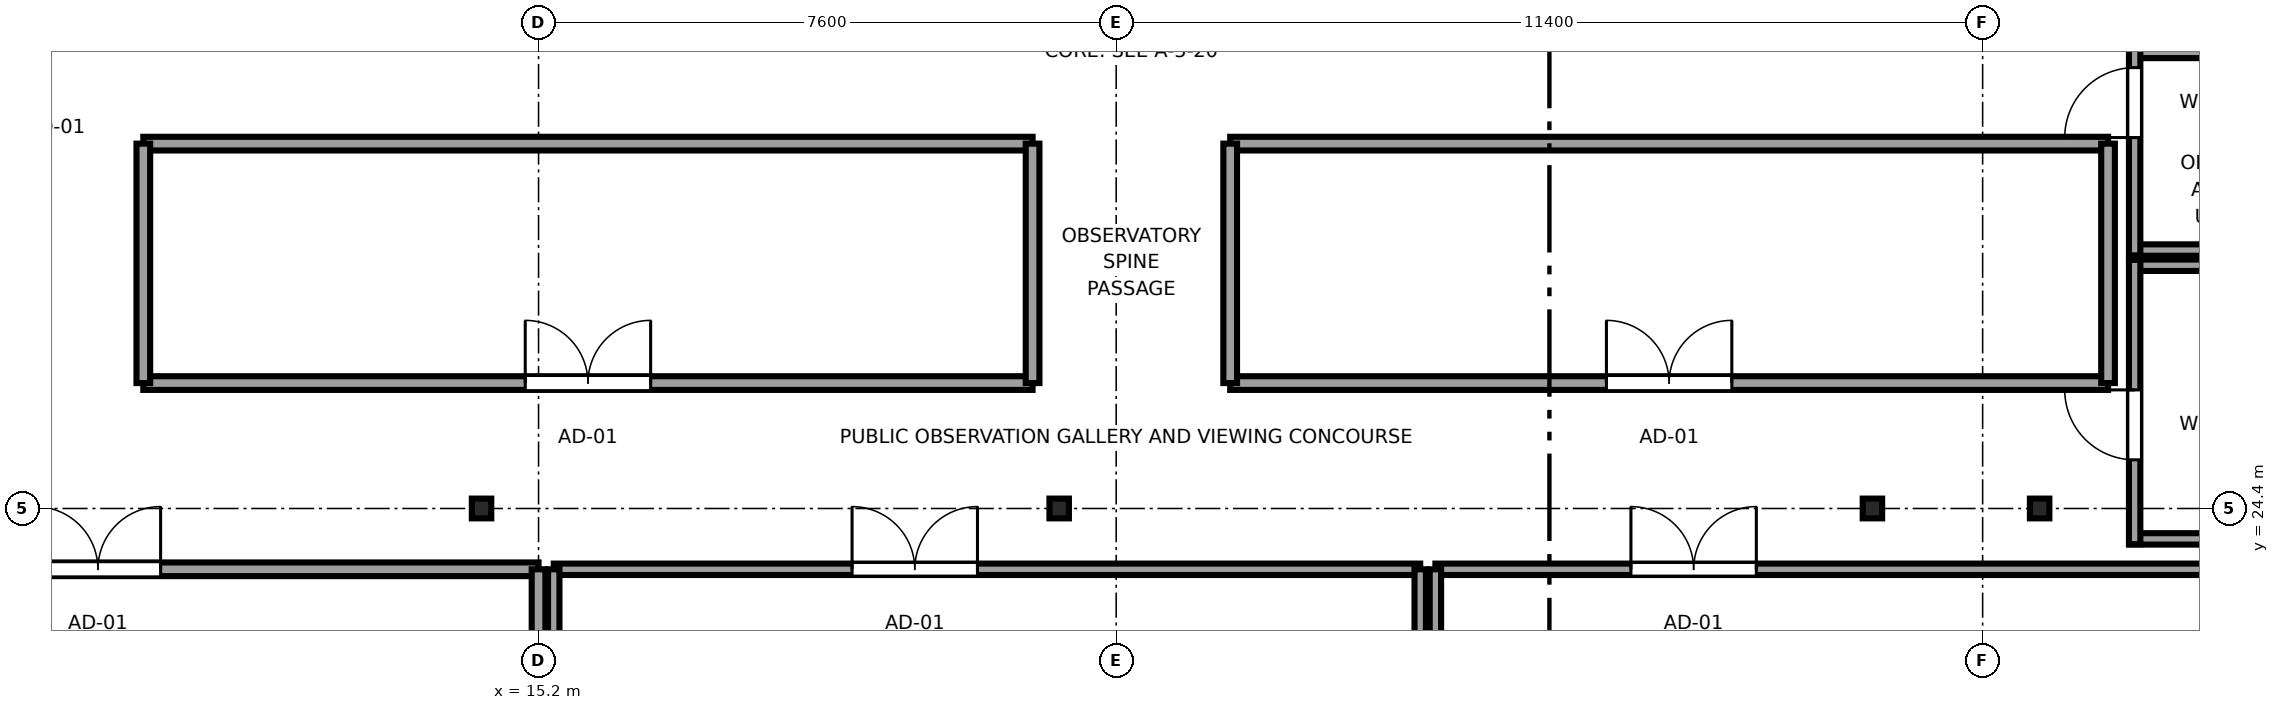
"""IFC4 building model, lengths in metres.
Left out: names, types, materials, properties, quantities, classifications, styles, units other than length and angle.
Written with IfcOpenShell. Run it as: python <this file> out.ifc"""

import sys

from ifc_helpers import new_model, si_unit, direction, frame, frame_2d, origin, origin_2d, place, context, subcontext, project, spatial, rectangle, i_section, extrude, source, transform, mapped, element, fill, save


model = new_model("IFC4")
c1 = context("Model", 3, precision=1e-05, world=origin(), true_north=direction((0.0, 1.0)))
c2 = subcontext(c1, "Body", "Model", "MODEL_VIEW")
j1 = project(units=[si_unit("LENGTHUNIT", "METRE"), si_unit("PLANEANGLEUNIT", "RADIAN")], contexts=[c1])
p1 = place(None, origin())
s1 = spatial("IfcSite", under=j1, at=p1, CompositionType="ELEMENT")
p2 = place(p1, origin())
s2 = spatial("IfcBuilding", under=s1, at=p2, CompositionType="ELEMENT")
p3 = place(p2, frame((0.0, 0.0, 282.15)))
s3 = spatial("IfcBuildingStorey", under=s2, at=p3, CompositionType="ELEMENT", Elevation=282.15)
m1 = source(origin(), c2, "Body", "SweptSolid", [
    extrude(i_section(OverallWidth=0.256, OverallDepth=0.26, WebThickness=0.01, FlangeThickness=0.017, FilletRadius=0.014, at=origin_2d()), origin(), (0.0, 0.0, 1.0), 4.4),
])
for number, where, z_axis, x_axis in (
    (1, (14.45, 24.4, 0.0), (0.0, 0.0, 1.0), (1.0, 0.0, 0.0)),
    (2, (22.05, 24.4, 0.0), (0.0, 0.0, 1.0), (1.0, 0.0, 0.0)),
    (3, (32.75, 24.4, 0.0), (0.0, 0.0, 1.0), (1.0, 0.0, 0.0)),
    (4, (34.95, 24.4, 0.0), (0.0, 0.0, 1.0), (1.0, 0.0, 0.0)),
):
    element("IfcColumn", number, at=place(p3, frame(where, z_axis=z_axis, x_axis=x_axis)), inside=s3, PredefinedType="COLUMN", context=c2, shape_type="MappedRepresentation", body=[
        mapped(m1, transform((0.0, 0.0, 0.0), x_axis=(1.0, 0.0, 0.0), y_axis=(0.0, 1.0, 0.0), z_axis=(0.0, 0.0, 1.0), scale=1.0)),
    ])
p4 = place(p3, frame((3.005, 23.6, 0.0), z_axis=(0.0, 0.0, 1.0), x_axis=(1.0, 0.0, 0.0)))
e5 = element("IfcWall", 5, at=p4, inside=s3, PredefinedType="PARTITIONING", context=c2, shape_type="SweptSolid", body=[
    extrude(rectangle(XDim=12.195, YDim=0.18, at=frame_2d((6.098, 0.0))), origin(), (0.0, 0.0, 1.0), 4.18),
])
p5 = place(p4, frame((5.573, 0.0, 0.0)))
e6 = element("IfcOpeningElement", 6, at=p5, cuts=e5, PredefinedType="OPENING", context=c2, shape_type="SweptSolid", body=[
    extrude(rectangle(XDim=1.65, YDim=2.15, at=frame_2d((0.825, 1.075))), frame((0.0, 0.1, 0.0), z_axis=(0.0, -1.0, 0.0), x_axis=(1.0, 0.0, 0.0)), (0.0, 0.0, 1.0), 0.2),
])
p6 = place(p3, frame((15.2, 5.605, 0.0), z_axis=(0.0, 0.0, 1.0), x_axis=(0.0, 1.0, 0.0)))
e7 = element("IfcWall", 7, at=p6, inside=s3, PredefinedType="PARTITIONING", context=c2, shape_type="SweptSolid", body=[
    extrude(rectangle(XDim=17.995, YDim=0.18, at=frame_2d((8.998, 0.0))), origin(), (0.0, 0.0, 1.0), 4.18),
])
p7 = place(p3, frame((15.4, 23.6, 0.0), z_axis=(0.0, 0.0, 1.0), x_axis=(1.0, 0.0, 0.0)))
e8 = element("IfcWall", 8, at=p7, inside=s3, PredefinedType="PARTITIONING", context=c2, shape_type="SweptSolid", body=[
    extrude(rectangle(XDim=11.4, YDim=0.15, at=frame_2d((5.7, 0.0))), origin(), (0.0, 0.0, 1.0), 4.18),
])
p8 = place(p7, frame((3.925, 0.0, 0.0)))
e9 = element("IfcOpeningElement", 9, at=p8, cuts=e8, PredefinedType="OPENING", context=c2, shape_type="SweptSolid", body=[
    extrude(rectangle(XDim=1.65, YDim=2.15, at=frame_2d((0.825, 1.075))), frame((0.0, 0.085, 0.0), z_axis=(0.0, -1.0, 0.0), x_axis=(1.0, 0.0, 0.0)), (0.0, 0.0, 1.0), 0.17),
])
for number, where, z_axis, x_axis in (
    (10, (15.4, 5.605, 0.0), (0.0, 0.0, 1.0), (0.0, 1.0, 0.0)),
    (11, (26.8, 5.605, 0.0), (0.0, 0.0, 1.0), (0.0, 1.0, 0.0)),
):
    element("IfcWall", number, at=place(p3, frame(where, z_axis=z_axis, x_axis=x_axis)), inside=s3, PredefinedType="PARTITIONING", context=c2, shape_type="SweptSolid", body=[
        extrude(rectangle(XDim=17.995, YDim=0.15, at=frame_2d((8.998, 0.0))), origin(), (0.0, 0.0, 1.0), 4.18),
    ])
p9 = place(p3, frame((27.0, 23.6, 0.0), z_axis=(0.0, 0.0, 1.0), x_axis=(1.0, 0.0, 0.0)))
e12 = element("IfcWall", 12, at=p9, inside=s3, PredefinedType="PARTITIONING", context=c2, shape_type="SweptSolid", body=[
    extrude(rectangle(XDim=11.595, YDim=0.15, at=frame_2d((5.797, 0.0))), origin(), (0.0, 0.0, 1.0), 4.18),
])
p10 = place(p9, frame((2.573, 0.0, 0.0)))
e13 = element("IfcOpeningElement", 13, at=p10, cuts=e12, PredefinedType="OPENING", context=c2, shape_type="SweptSolid", body=[
    extrude(rectangle(XDim=1.65, YDim=2.15, at=frame_2d((0.825, 1.075))), frame((0.0, 0.085, 0.0), z_axis=(0.0, -1.0, 0.0), x_axis=(1.0, 0.0, 0.0)), (0.0, 0.0, 1.0), 0.17),
])
p11 = place(p3, frame((27.0, 5.605, 0.0), z_axis=(0.0, 0.0, 1.0), x_axis=(0.0, 1.0, 0.0)))
e14 = element("IfcWall", 14, at=p11, inside=s3, PredefinedType="PARTITIONING", context=c2, shape_type="SweptSolid", body=[
    extrude(rectangle(XDim=17.995, YDim=0.15, at=frame_2d((8.998, 0.0))), origin(), (0.0, 0.0, 1.0), 4.18),
])
p12 = place(p3, frame((10.0, 26.05, 0.0), z_axis=(0.0, 0.0, 1.0), x_axis=(1.0, 0.0, 0.0)))
e15 = element("IfcWall", 15, at=p12, inside=s3, PredefinedType="PARTITIONING", context=c2, shape_type="SweptSolid", body=[
    extrude(rectangle(XDim=11.7, YDim=0.18, at=frame_2d((5.85, 0.0))), origin(), (0.0, 0.0, 1.0), 4.18),
])
p13 = place(p12, frame((5.025, 0.0, 0.0)))
e16 = element("IfcOpeningElement", 16, at=p13, cuts=e15, PredefinedType="OPENING", context=c2, shape_type="SweptSolid", body=[
    extrude(rectangle(XDim=1.65, YDim=2.15, at=frame_2d((0.825, 1.075))), frame((0.0, 0.1, 0.0), z_axis=(0.0, -1.0, 0.0), x_axis=(1.0, 0.0, 0.0)), (0.0, 0.0, 1.0), 0.2),
])
p14 = place(p3, frame((10.0, 29.2, 0.0), z_axis=(0.0, 0.0, 1.0), x_axis=(1.0, 0.0, 0.0)))
e17 = element("IfcWall", 17, at=p14, inside=s3, PredefinedType="PARTITIONING", context=c2, shape_type="SweptSolid", body=[
    extrude(rectangle(XDim=11.7, YDim=0.18, at=frame_2d((5.85, 0.0))), origin(), (0.0, 0.0, 1.0), 4.18),
])
for number, where, z_axis, x_axis in (
    (18, (10.0, 26.05, 0.0), (0.0, 0.0, 1.0), (0.0, 1.0, 0.0)),
    (19, (21.7, 26.05, 0.0), (0.0, 0.0, 1.0), (0.0, 1.0, 0.0)),
):
    element("IfcWall", number, at=place(p3, frame(where, z_axis=z_axis, x_axis=x_axis)), inside=s3, PredefinedType="PARTITIONING", context=c2, shape_type="SweptSolid", body=[
        extrude(rectangle(XDim=3.15, YDim=0.18, at=frame_2d((1.575, 0.0))), origin(), (0.0, 0.0, 1.0), 4.18),
    ])
p15 = place(p3, frame((24.3, 26.05, 0.0), z_axis=(0.0, 0.0, 1.0), x_axis=(1.0, 0.0, 0.0)))
e20 = element("IfcWall", 20, at=p15, inside=s3, PredefinedType="PARTITIONING", context=c2, shape_type="SweptSolid", body=[
    extrude(rectangle(XDim=11.55, YDim=0.18, at=frame_2d((5.775, 0.0))), origin(), (0.0, 0.0, 1.0), 4.18),
])
p16 = place(p15, frame((4.95, 0.0, 0.0)))
e21 = element("IfcOpeningElement", 21, at=p16, cuts=e20, PredefinedType="OPENING", context=c2, shape_type="SweptSolid", body=[
    extrude(rectangle(XDim=1.65, YDim=2.15, at=frame_2d((0.825, 1.075))), frame((0.0, 0.1, 0.0), z_axis=(0.0, -1.0, 0.0), x_axis=(1.0, 0.0, 0.0)), (0.0, 0.0, 1.0), 0.2),
])
p17 = place(p3, frame((24.3, 29.2, 0.0), z_axis=(0.0, 0.0, 1.0), x_axis=(1.0, 0.0, 0.0)))
e22 = element("IfcWall", 22, at=p17, inside=s3, PredefinedType="PARTITIONING", context=c2, shape_type="SweptSolid", body=[
    extrude(rectangle(XDim=11.55, YDim=0.18, at=frame_2d((5.775, 0.0))), origin(), (0.0, 0.0, 1.0), 4.18),
])
for number, where, z_axis, x_axis in (
    (23, (24.3, 26.05, 0.0), (0.0, 0.0, 1.0), (0.0, 1.0, 0.0)),
    (24, (35.85, 26.05, 0.0), (0.0, 0.0, 1.0), (0.0, 1.0, 0.0)),
):
    element("IfcWall", number, at=place(p3, frame(where, z_axis=z_axis, x_axis=x_axis)), inside=s3, PredefinedType="PARTITIONING", context=c2, shape_type="SweptSolid", body=[
        extrude(rectangle(XDim=3.15, YDim=0.18, at=frame_2d((1.575, 0.0))), origin(), (0.0, 0.0, 1.0), 4.18),
    ])
for number, where, z_axis, x_axis in (
    (25, (36.13, 24.0, 0.0), (0.0, 0.0, 1.0), (1.0, 0.0, 0.0)),
    (26, (36.13, 27.6, 0.0), (0.0, 0.0, 1.0), (1.0, 0.0, 0.0)),
):
    element("IfcWall", number, at=place(p3, frame(where, z_axis=z_axis, x_axis=x_axis)), inside=s3, PredefinedType="PARTITIONING", context=c2, shape_type="SweptSolid", body=[
        extrude(rectangle(XDim=2.465, YDim=0.15, at=frame_2d((1.232, 0.0))), origin(), (0.0, 0.0, 1.0), 4.18),
    ])
p18 = place(p3, frame((36.2, 23.93, 0.0), z_axis=(0.0, 0.0, 1.0), x_axis=(0.0, 1.0, 0.0)))
e27 = element("IfcWall", 27, at=p18, inside=s3, PredefinedType="PARTITIONING", context=c2, shape_type="SweptSolid", body=[
    extrude(rectangle(XDim=3.74, YDim=0.15, at=frame_2d((1.87, 0.0))), origin(), (0.0, 0.0, 1.0), 4.18),
])
p19 = place(p18, frame((1.11, 0.0, 0.0)))
e28 = element("IfcOpeningElement", 28, at=p19, cuts=e27, PredefinedType="OPENING", context=c2, shape_type="SweptSolid", body=[
    extrude(rectangle(XDim=0.92, YDim=2.01, at=frame_2d((0.46, 1.005))), frame((0.0, 0.085, 0.0), z_axis=(0.0, -1.0, 0.0), x_axis=(1.0, 0.0, 0.0)), (0.0, 0.0, 1.0), 0.17),
])
for number, where, z_axis, x_axis in (
    (29, (36.13, 27.8, 0.0), (0.0, 0.0, 1.0), (1.0, 0.0, 0.0)),
    (30, (36.13, 30.4, 0.0), (0.0, 0.0, 1.0), (1.0, 0.0, 0.0)),
):
    element("IfcWall", number, at=place(p3, frame(where, z_axis=z_axis, x_axis=x_axis)), inside=s3, PredefinedType="PARTITIONING", context=c2, shape_type="SweptSolid", body=[
        extrude(rectangle(XDim=2.465, YDim=0.15, at=frame_2d((1.232, 0.0))), origin(), (0.0, 0.0, 1.0), 4.18),
    ])
p20 = place(p3, frame((36.2, 27.73, 0.0), z_axis=(0.0, 0.0, 1.0), x_axis=(0.0, 1.0, 0.0)))
e31 = element("IfcWall", 31, at=p20, inside=s3, PredefinedType="PARTITIONING", context=c2, shape_type="SweptSolid", body=[
    extrude(rectangle(XDim=2.74, YDim=0.15, at=frame_2d((1.37, 0.0))), origin(), (0.0, 0.0, 1.0), 4.18),
])
p21 = place(p20, frame((1.55, 0.0, 0.0)))
e32 = element("IfcOpeningElement", 32, at=p21, cuts=e31, PredefinedType="OPENING", context=c2, shape_type="SweptSolid", body=[
    extrude(rectangle(XDim=0.92, YDim=2.01, at=frame_2d((0.46, 1.005))), frame((0.0, 0.085, 0.0), z_axis=(0.0, -1.0, 0.0), x_axis=(1.0, 0.0, 0.0)), (0.0, 0.0, 1.0), 0.17),
])
m2 = source(origin(), c2, "Body", "SweptSolid", [
    extrude(rectangle(XDim=1.65, YDim=2.15, at=frame_2d((0.825, 1.075))), frame((0.0, 0.025, 0.0), z_axis=(0.0, -1.0, 0.0), x_axis=(1.0, 0.0, 0.0)), (0.0, 0.0, 1.0), 0.05),
])
p22 = place(p5, origin())
e33 = element("IfcDoor", 33, at=p22, inside=s3, OperationType="DOUBLE_DOOR_SINGLE_SWING", PredefinedType="DOOR", context=c2, shape_type="MappedRepresentation", body=[
    mapped(m2, transform((0.0, 0.0, 0.0), x_axis=(1.0, 0.0, 0.0), y_axis=(0.0, 1.0, 0.0), z_axis=(0.0, 0.0, 1.0), scale=1.0)),
])
fill(e6, e33)
p23 = place(p8, origin())
e34 = element("IfcDoor", 34, at=p23, inside=s3, OperationType="DOUBLE_DOOR_SINGLE_SWING", PredefinedType="DOOR", context=c2, shape_type="MappedRepresentation", body=[
    mapped(m2, transform((0.0, 0.0, 0.0), x_axis=(1.0, 0.0, 0.0), y_axis=(0.0, 1.0, 0.0), z_axis=(0.0, 0.0, 1.0), scale=1.0)),
])
fill(e9, e34)
p24 = place(p10, origin())
e35 = element("IfcDoor", 35, at=p24, inside=s3, OperationType="DOUBLE_DOOR_SINGLE_SWING", PredefinedType="DOOR", context=c2, shape_type="MappedRepresentation", body=[
    mapped(m2, transform((0.0, 0.0, 0.0), x_axis=(1.0, 0.0, 0.0), y_axis=(0.0, 1.0, 0.0), z_axis=(0.0, 0.0, 1.0), scale=1.0)),
])
fill(e13, e35)
p25 = place(p13, origin())
e36 = element("IfcDoor", 36, at=p25, inside=s3, OperationType="DOUBLE_DOOR_SINGLE_SWING", PredefinedType="DOOR", context=c2, shape_type="MappedRepresentation", body=[
    mapped(m2, transform((0.0, 0.0, 0.0), x_axis=(1.0, 0.0, 0.0), y_axis=(0.0, 1.0, 0.0), z_axis=(0.0, 0.0, 1.0), scale=1.0)),
])
fill(e16, e36)
p26 = place(p16, origin())
e37 = element("IfcDoor", 37, at=p26, inside=s3, OperationType="DOUBLE_DOOR_SINGLE_SWING", PredefinedType="DOOR", context=c2, shape_type="MappedRepresentation", body=[
    mapped(m2, transform((0.0, 0.0, 0.0), x_axis=(1.0, 0.0, 0.0), y_axis=(0.0, 1.0, 0.0), z_axis=(0.0, 0.0, 1.0), scale=1.0)),
])
fill(e21, e37)
m3 = source(origin(), c2, "Body", "SweptSolid", [
    extrude(rectangle(XDim=0.92, YDim=2.01, at=frame_2d((0.46, 1.005))), frame((0.0, 0.025, 0.0), z_axis=(0.0, -1.0, 0.0), x_axis=(1.0, 0.0, 0.0)), (0.0, 0.0, 1.0), 0.05),
])
p27 = place(p19, origin())
e38 = element("IfcDoor", 38, at=p27, inside=s3, OperationType="SINGLE_SWING_RIGHT", PredefinedType="DOOR", context=c2, shape_type="MappedRepresentation", body=[
    mapped(m3, transform((0.0, 0.0, 0.0), x_axis=(1.0, 0.0, 0.0), y_axis=(0.0, 1.0, 0.0), z_axis=(0.0, 0.0, 1.0), scale=1.0)),
])
fill(e28, e38)
p28 = place(p21, origin())
e39 = element("IfcDoor", 39, at=p28, inside=s3, OperationType="SINGLE_SWING_LEFT", PredefinedType="DOOR", context=c2, shape_type="MappedRepresentation", body=[
    mapped(m3, transform((0.0, 0.0, 0.0), x_axis=(1.0, 0.0, 0.0), y_axis=(0.0, 1.0, 0.0), z_axis=(0.0, 0.0, 1.0), scale=1.0)),
])
fill(e32, e39)
save(model, sys.argv[1])
